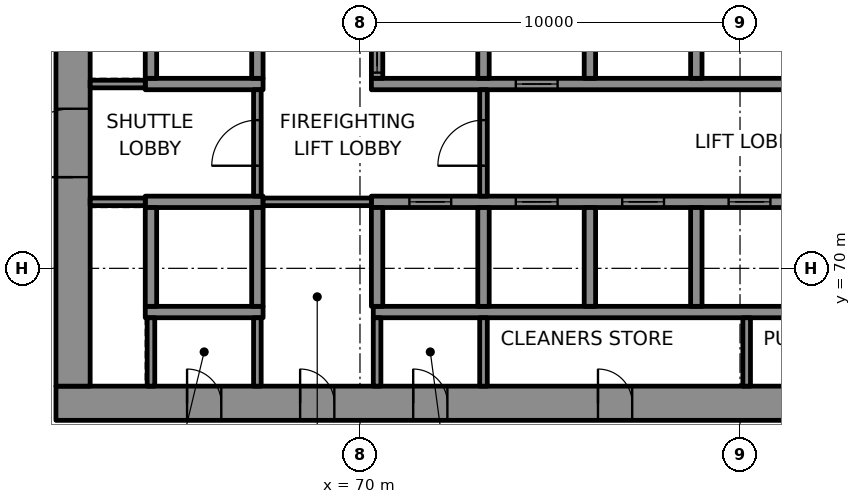
"""IFC4 building model, lengths in metres.
Left out: names, types, materials, properties, quantities, classifications, styles, units other than length and angle.
Written with IfcOpenShell. Run it as: python <this file> out.ifc"""

import sys

from ifc_helpers import new_model, si_unit, direction, frame, frame_2d, origin, place, context, subcontext, project, spatial, rectangle, extrude, element, fill, save


model = new_model("IFC4")
c1 = context("Model", 3, precision=1e-05, world=origin(), true_north=direction((0.0, 1.0)))
c2 = subcontext(c1, "Body", "Model", "MODEL_VIEW")
j1 = project(units=[si_unit("LENGTHUNIT", "METRE"), si_unit("PLANEANGLEUNIT", "RADIAN")], contexts=[c1])
p1 = place(None, origin())
s1 = spatial("IfcSite", under=j1, at=p1, CompositionType="ELEMENT")
p2 = place(p1, origin())
s2 = spatial("IfcBuilding", under=s1, at=p2, CompositionType="ELEMENT")
p3 = place(p2, frame((0.0, 0.0, 12.6)))
s3 = spatial("IfcBuildingStorey", under=s2, at=p3, CompositionType="ELEMENT", Elevation=12.6)
p4 = place(p3, frame((62.0, 66.45, 0.0), z_axis=(0.0, 0.0, 1.0), x_axis=(1.0, 0.0, 0.0)))
e1 = element("IfcWall", 1, at=p4, inside=s3, PredefinedType="SHEAR", context=c2, shape_type="SweptSolid", body=[
    extrude(rectangle(XDim=26.0, YDim=0.9, at=frame_2d((13.0, 0.0))), origin(), (0.0, 0.0, 1.0), 4.3),
])
p5 = place(p4, frame((3.45, 0.0, 0.0)))
e2 = element("IfcOpeningElement", 2, at=p5, cuts=e1, PredefinedType="OPENING", context=c2, shape_type="SweptSolid", body=[
    extrude(rectangle(XDim=0.9, YDim=2.1, at=frame_2d((0.45, 1.05))), frame((0.0, 0.46, 0.0), z_axis=(0.0, -1.0, 0.0), x_axis=(1.0, 0.0, 0.0)), (0.0, 0.0, 1.0), 0.92),
])
p6 = place(p4, frame((6.425, 0.0, 0.0)))
e3 = element("IfcOpeningElement", 3, at=p6, cuts=e1, PredefinedType="OPENING", context=c2, shape_type="SweptSolid", body=[
    extrude(rectangle(XDim=0.9, YDim=2.1, at=frame_2d((0.45, 1.05))), frame((0.0, 0.46, 0.0), z_axis=(0.0, -1.0, 0.0), x_axis=(1.0, 0.0, 0.0)), (0.0, 0.0, 1.0), 0.92),
])
p7 = place(p4, frame((9.4, 0.0, 0.0)))
e4 = element("IfcOpeningElement", 4, at=p7, cuts=e1, PredefinedType="OPENING", context=c2, shape_type="SweptSolid", body=[
    extrude(rectangle(XDim=0.9, YDim=2.1, at=frame_2d((0.45, 1.05))), frame((0.0, 0.46, 0.0), z_axis=(0.0, -1.0, 0.0), x_axis=(1.0, 0.0, 0.0)), (0.0, 0.0, 1.0), 0.92),
])
p8 = place(p4, frame((14.262, 0.0, 0.0)))
e5 = element("IfcOpeningElement", 5, at=p8, cuts=e1, PredefinedType="OPENING", context=c2, shape_type="SweptSolid", body=[
    extrude(rectangle(XDim=0.9, YDim=2.1, at=frame_2d((0.45, 1.05))), frame((0.0, 0.46, 0.0), z_axis=(0.0, -1.0, 0.0), x_axis=(1.0, 0.0, 0.0)), (0.0, 0.0, 1.0), 0.92),
])
p9 = place(p4, frame((21.188, 0.0, 0.0)))
e6 = element("IfcOpeningElement", 6, at=p9, cuts=e1, PredefinedType="OPENING", context=c2, shape_type="SweptSolid", body=[
    extrude(rectangle(XDim=0.9, YDim=2.1, at=frame_2d((0.45, 1.05))), frame((0.0, 0.46, 0.0), z_axis=(0.0, -1.0, 0.0), x_axis=(1.0, 0.0, 0.0)), (0.0, 0.0, 1.0), 0.92),
])
p10 = place(p3, frame((62.45, 66.9, 0.0), z_axis=(0.0, 0.0, 1.0), x_axis=(0.0, 1.0, 0.0)))
e7 = element("IfcWall", 7, at=p10, inside=s3, PredefinedType="SHEAR", context=c2, shape_type="SweptSolid", body=[
    extrude(rectangle(XDim=16.2, YDim=0.9, at=frame_2d((8.1, 0.0))), origin(), (0.0, 0.0, 1.0), 4.3),
])
p11 = place(p10, frame((5.5, 0.0, 0.0)))
e8 = element("IfcOpeningElement", 8, at=p11, cuts=e7, PredefinedType="OPENING", context=c2, shape_type="SweptSolid", body=[
    extrude(rectangle(XDim=1.8, YDim=2.1, at=frame_2d((0.9, 1.05))), frame((0.0, 0.46, 0.0), z_axis=(0.0, -1.0, 0.0), x_axis=(1.0, 0.0, 0.0)), (0.0, 0.0, 1.0), 0.92),
])
p12 = place(p3, frame((64.35, 68.85, 0.0), z_axis=(0.0, 0.0, 1.0), x_axis=(1.0, 0.0, 0.0)))
e9 = element("IfcWall", 9, at=p12, inside=s3, PredefinedType="SHEAR", context=c2, shape_type="SweptSolid", body=[
    extrude(rectangle(XDim=3.1, YDim=0.3, at=frame_2d((1.55, 0.0))), origin(), (0.0, 0.0, 1.0), 4.3),
])
p13 = place(p3, frame((70.35, 68.85, 0.0), z_axis=(0.0, 0.0, 1.0), x_axis=(1.0, 0.0, 0.0)))
e10 = element("IfcWall", 10, at=p13, inside=s3, PredefinedType="SHEAR", context=c2, shape_type="SweptSolid", body=[
    extrude(rectangle(XDim=16.75, YDim=0.3, at=frame_2d((8.375, 0.0))), origin(), (0.0, 0.0, 1.0), 4.3),
])
p14 = place(p3, frame((64.35, 71.75, 0.0), z_axis=(0.0, 0.0, 1.0), x_axis=(1.0, 0.0, 0.0)))
e11 = element("IfcWall", 11, at=p14, inside=s3, PredefinedType="SHEAR", context=c2, shape_type="SweptSolid", body=[
    extrude(rectangle(XDim=3.1, YDim=0.3, at=frame_2d((1.55, 0.0))), origin(), (0.0, 0.0, 1.0), 4.3),
])
p15 = place(p3, frame((70.3, 71.75, 0.0), z_axis=(0.0, 0.0, 1.0), x_axis=(1.0, 0.0, 0.0)))
e12 = element("IfcWall", 12, at=p15, inside=s3, PredefinedType="SHEAR", context=c2, shape_type="SweptSolid", body=[
    extrude(rectangle(XDim=16.8, YDim=0.3, at=frame_2d((8.4, 0.0))), origin(), (0.0, 0.0, 1.0), 4.3),
])
p16 = place(p15, frame((1.0, 0.0, 0.0)))
e13 = element("IfcOpeningElement", 13, at=p16, cuts=e12, PredefinedType="OPENING", context=c2, shape_type="SweptSolid", body=[
    extrude(rectangle(XDim=1.1, YDim=2.1, at=frame_2d((0.55, 1.05))), frame((0.0, 0.16, 0.0), z_axis=(0.0, -1.0, 0.0), x_axis=(1.0, 0.0, 0.0)), (0.0, 0.0, 1.0), 0.32),
])
p17 = place(p15, frame((3.8, 0.0, 0.0)))
e14 = element("IfcOpeningElement", 14, at=p17, cuts=e12, PredefinedType="OPENING", context=c2, shape_type="SweptSolid", body=[
    extrude(rectangle(XDim=1.1, YDim=2.1, at=frame_2d((0.55, 1.05))), frame((0.0, 0.16, 0.0), z_axis=(0.0, -1.0, 0.0), x_axis=(1.0, 0.0, 0.0)), (0.0, 0.0, 1.0), 0.32),
])
p18 = place(p15, frame((6.6, 0.0, 0.0)))
e15 = element("IfcOpeningElement", 15, at=p18, cuts=e12, PredefinedType="OPENING", context=c2, shape_type="SweptSolid", body=[
    extrude(rectangle(XDim=1.1, YDim=2.1, at=frame_2d((0.55, 1.05))), frame((0.0, 0.16, 0.0), z_axis=(0.0, -1.0, 0.0), x_axis=(1.0, 0.0, 0.0)), (0.0, 0.0, 1.0), 0.32),
])
p19 = place(p15, frame((9.4, 0.0, 0.0)))
e16 = element("IfcOpeningElement", 16, at=p19, cuts=e12, PredefinedType="OPENING", context=c2, shape_type="SweptSolid", body=[
    extrude(rectangle(XDim=1.1, YDim=2.1, at=frame_2d((0.55, 1.05))), frame((0.0, 0.16, 0.0), z_axis=(0.0, -1.0, 0.0), x_axis=(1.0, 0.0, 0.0)), (0.0, 0.0, 1.0), 0.32),
])
p20 = place(p15, frame((12.2, 0.0, 0.0)))
e17 = element("IfcOpeningElement", 17, at=p20, cuts=e12, PredefinedType="OPENING", context=c2, shape_type="SweptSolid", body=[
    extrude(rectangle(XDim=1.1, YDim=2.1, at=frame_2d((0.55, 1.05))), frame((0.0, 0.16, 0.0), z_axis=(0.0, -1.0, 0.0), x_axis=(1.0, 0.0, 0.0)), (0.0, 0.0, 1.0), 0.32),
])
p21 = place(p15, frame((14.925, 0.0, 0.0)))
e18 = element("IfcOpeningElement", 18, at=p21, cuts=e12, PredefinedType="OPENING", context=c2, shape_type="SweptSolid", body=[
    extrude(rectangle(XDim=1.1, YDim=2.1, at=frame_2d((0.55, 1.05))), frame((0.0, 0.16, 0.0), z_axis=(0.0, -1.0, 0.0), x_axis=(1.0, 0.0, 0.0)), (0.0, 0.0, 1.0), 0.32),
])
p22 = place(p3, frame((64.35, 74.85, 0.0), z_axis=(0.0, 0.0, 1.0), x_axis=(1.0, 0.0, 0.0)))
e19 = element("IfcWall", 19, at=p22, inside=s3, PredefinedType="SHEAR", context=c2, shape_type="SweptSolid", body=[
    extrude(rectangle(XDim=3.1, YDim=0.3, at=frame_2d((1.55, 0.0))), origin(), (0.0, 0.0, 1.0), 4.3),
])
p23 = place(p3, frame((70.3, 74.85, 0.0), z_axis=(0.0, 0.0, 1.0), x_axis=(1.0, 0.0, 0.0)))
e20 = element("IfcWall", 20, at=p23, inside=s3, PredefinedType="SHEAR", context=c2, shape_type="SweptSolid", body=[
    extrude(rectangle(XDim=16.8, YDim=0.3, at=frame_2d((8.4, 0.0))), origin(), (0.0, 0.0, 1.0), 4.3),
])
p24 = place(p23, frame((3.8, 0.0, 0.0)))
e21 = element("IfcOpeningElement", 21, at=p24, cuts=e20, PredefinedType="OPENING", context=c2, shape_type="SweptSolid", body=[
    extrude(rectangle(XDim=1.1, YDim=2.1, at=frame_2d((0.55, 1.05))), frame((0.0, 0.16, 0.0), z_axis=(0.0, -1.0, 0.0), x_axis=(1.0, 0.0, 0.0)), (0.0, 0.0, 1.0), 0.32),
])
p25 = place(p23, frame((12.2, 0.0, 0.0)))
e22 = element("IfcOpeningElement", 22, at=p25, cuts=e20, PredefinedType="OPENING", context=c2, shape_type="SweptSolid", body=[
    extrude(rectangle(XDim=1.1, YDim=2.1, at=frame_2d((0.55, 1.05))), frame((0.0, 0.16, 0.0), z_axis=(0.0, -1.0, 0.0), x_axis=(1.0, 0.0, 0.0)), (0.0, 0.0, 1.0), 0.32),
])
p26 = place(p23, frame((14.925, 0.0, 0.0)))
e23 = element("IfcOpeningElement", 23, at=p26, cuts=e20, PredefinedType="OPENING", context=c2, shape_type="SweptSolid", body=[
    extrude(rectangle(XDim=1.1, YDim=2.1, at=frame_2d((0.55, 1.05))), frame((0.0, 0.16, 0.0), z_axis=(0.0, -1.0, 0.0), x_axis=(1.0, 0.0, 0.0)), (0.0, 0.0, 1.0), 0.32),
])
for number, where, z_axis, x_axis in (
    (24, (64.5, 69.0, 0.0), (0.0, 0.0, 1.0), (0.0, 1.0, 0.0)),
    (25, (64.5, 75.0, 0.0), (0.0, 0.0, 1.0), (0.0, 1.0, 0.0)),
    (26, (67.3, 69.0, 0.0), (0.0, 0.0, 1.0), (0.0, 1.0, 0.0)),
    (27, (67.3, 75.0, 0.0), (0.0, 0.0, 1.0), (0.0, 1.0, 0.0)),
    (28, (70.45, 69.0, 0.0), (0.0, 0.0, 1.0), (0.0, 1.0, 0.0)),
):
    element("IfcWall", number, at=place(p3, frame(where, z_axis=z_axis, x_axis=x_axis)), inside=s3, PredefinedType="SHEAR", context=c2, shape_type="SweptSolid", body=[
        extrude(rectangle(XDim=2.6, YDim=0.3, at=frame_2d((1.3, 0.0))), origin(), (0.0, 0.0, 1.0), 4.3),
    ])
p27 = place(p3, frame((70.45, 75.0, 0.0), z_axis=(0.0, 0.0, 1.0), x_axis=(0.0, 1.0, 0.0)))
e29 = element("IfcWall", 29, at=p27, inside=s3, PredefinedType="SHEAR", context=c2, shape_type="SweptSolid", body=[
    extrude(rectangle(XDim=2.6, YDim=0.3, at=frame_2d((1.3, 0.0))), origin(), (0.0, 0.0, 1.0), 4.3),
])
p28 = place(p27, frame((0.15, 0.0, 0.0)))
e30 = element("IfcOpeningElement", 30, at=p28, cuts=e29, PredefinedType="OPENING", context=c2, shape_type="SweptSolid", body=[
    extrude(rectangle(XDim=1.1, YDim=2.1, at=frame_2d((0.55, 1.05))), frame((0.0, 0.16, 0.0), z_axis=(0.0, -1.0, 0.0), x_axis=(1.0, 0.0, 0.0)), (0.0, 0.0, 1.0), 0.32),
])
for number, where, z_axis, x_axis in (
    (31, (73.25, 69.0, 0.0), (0.0, 0.0, 1.0), (0.0, 1.0, 0.0)),
    (32, (73.25, 75.0, 0.0), (0.0, 0.0, 1.0), (0.0, 1.0, 0.0)),
    (33, (76.05, 69.0, 0.0), (0.0, 0.0, 1.0), (0.0, 1.0, 0.0)),
    (34, (76.05, 75.0, 0.0), (0.0, 0.0, 1.0), (0.0, 1.0, 0.0)),
    (35, (78.85, 69.0, 0.0), (0.0, 0.0, 1.0), (0.0, 1.0, 0.0)),
    (36, (78.85, 75.0, 0.0), (0.0, 0.0, 1.0), (0.0, 1.0, 0.0)),
):
    element("IfcWall", number, at=place(p3, frame(where, z_axis=z_axis, x_axis=x_axis)), inside=s3, PredefinedType="SHEAR", context=c2, shape_type="SweptSolid", body=[
        extrude(rectangle(XDim=2.6, YDim=0.3, at=frame_2d((1.3, 0.0))), origin(), (0.0, 0.0, 1.0), 4.3),
    ])
p29 = place(p3, frame((62.9, 71.75, 0.0), z_axis=(0.0, 0.0, 1.0), x_axis=(1.0, 0.0, 0.0)))
e37 = element("IfcWall", 37, at=p29, inside=s3, PredefinedType="PARTITIONING", context=c2, shape_type="SweptSolid", body=[
    extrude(rectangle(XDim=1.45, YDim=0.2, at=frame_2d((0.725, 0.0))), origin(), (0.0, 0.0, 1.0), 4.3),
])
p30 = place(p3, frame((67.45, 71.75, 0.0), z_axis=(0.0, 0.0, 1.0), x_axis=(1.0, 0.0, 0.0)))
e38 = element("IfcWall", 38, at=p30, inside=s3, PredefinedType="PARTITIONING", context=c2, shape_type="SweptSolid", body=[
    extrude(rectangle(XDim=2.85, YDim=0.2, at=frame_2d((1.425, 0.0))), origin(), (0.0, 0.0, 1.0), 4.3),
])
p31 = place(p3, frame((62.9, 74.85, 0.0), z_axis=(0.0, 0.0, 1.0), x_axis=(1.0, 0.0, 0.0)))
e39 = element("IfcWall", 39, at=p31, inside=s3, PredefinedType="PARTITIONING", context=c2, shape_type="SweptSolid", body=[
    extrude(rectangle(XDim=1.45, YDim=0.2, at=frame_2d((0.725, 0.0))), origin(), (0.0, 0.0, 1.0), 4.3),
])
for number, where, z_axis, x_axis in (
    (40, (64.5, 66.9, 0.0), (0.0, 0.0, 1.0), (0.0, 1.0, 0.0)),
    (41, (67.3, 66.9, 0.0), (0.0, 0.0, 1.0), (0.0, 1.0, 0.0)),
):
    element("IfcWall", number, at=place(p3, frame(where, z_axis=z_axis, x_axis=x_axis)), inside=s3, PredefinedType="PARTITIONING", context=c2, shape_type="SweptSolid", body=[
        extrude(rectangle(XDim=1.8, YDim=0.2, at=frame_2d((0.9, 0.0))), origin(), (0.0, 0.0, 1.0), 4.3),
    ])
p32 = place(p3, frame((67.3, 71.9, 0.0), z_axis=(0.0, 0.0, 1.0), x_axis=(0.0, 1.0, 0.0)))
e42 = element("IfcWall", 42, at=p32, inside=s3, PredefinedType="PARTITIONING", context=c2, shape_type="SweptSolid", body=[
    extrude(rectangle(XDim=2.8, YDim=0.2, at=frame_2d((1.4, 0.0))), origin(), (0.0, 0.0, 1.0), 4.3),
])
p33 = place(p32, frame((0.8, 0.0, 0.0)))
e43 = element("IfcOpeningElement", 43, at=p33, cuts=e42, PredefinedType="OPENING", context=c2, shape_type="SweptSolid", body=[
    extrude(rectangle(XDim=1.2, YDim=2.1, at=frame_2d((0.6, 1.05))), frame((0.0, 0.11, 0.0), z_axis=(0.0, -1.0, 0.0), x_axis=(1.0, 0.0, 0.0)), (0.0, 0.0, 1.0), 0.22),
])
for number, where, z_axis, x_axis in (
    (44, (70.45, 66.9, 0.0), (0.0, 0.0, 1.0), (0.0, 1.0, 0.0)),
    (45, (73.25, 66.9, 0.0), (0.0, 0.0, 1.0), (0.0, 1.0, 0.0)),
):
    element("IfcWall", number, at=place(p3, frame(where, z_axis=z_axis, x_axis=x_axis)), inside=s3, PredefinedType="PARTITIONING", context=c2, shape_type="SweptSolid", body=[
        extrude(rectangle(XDim=1.8, YDim=0.2, at=frame_2d((0.9, 0.0))), origin(), (0.0, 0.0, 1.0), 4.3),
    ])
p34 = place(p3, frame((73.25, 71.9, 0.0), z_axis=(0.0, 0.0, 1.0), x_axis=(0.0, 1.0, 0.0)))
e46 = element("IfcWall", 46, at=p34, inside=s3, PredefinedType="PARTITIONING", context=c2, shape_type="SweptSolid", body=[
    extrude(rectangle(XDim=2.8, YDim=0.2, at=frame_2d((1.4, 0.0))), origin(), (0.0, 0.0, 1.0), 4.3),
])
p35 = place(p34, frame((0.8, 0.0, 0.0)))
e47 = element("IfcOpeningElement", 47, at=p35, cuts=e46, PredefinedType="OPENING", context=c2, shape_type="SweptSolid", body=[
    extrude(rectangle(XDim=1.2, YDim=2.1, at=frame_2d((0.6, 1.05))), frame((0.0, 0.11, 0.0), z_axis=(0.0, -1.0, 0.0), x_axis=(1.0, 0.0, 0.0)), (0.0, 0.0, 1.0), 0.22),
])
p36 = place(p3, frame((80.175, 66.9, 0.0), z_axis=(0.0, 0.0, 1.0), x_axis=(0.0, 1.0, 0.0)))
e48 = element("IfcWall", 48, at=p36, inside=s3, PredefinedType="PARTITIONING", context=c2, shape_type="SweptSolid", body=[
    extrude(rectangle(XDim=1.8, YDim=0.2, at=frame_2d((0.9, 0.0))), origin(), (0.0, 0.0, 1.0), 4.3),
])
p37 = place(p3, frame((107.106, 62.36, 0.0), z_axis=(0.0, 0.0, 1.0), x_axis=(-0.49999992739, 0.866025445706, 0.0)))
e49 = element("IfcWall", 49, at=p37, inside=s3, PredefinedType="SOLIDWALL", context=c2, shape_type="SweptSolid", body=[
    extrude(rectangle(XDim=54.0, YDim=0.4, at=frame_2d((27.0, 0.0))), origin(), (0.0, 0.0, 1.0), 4.24),
])
p38 = place(p16, origin())
e50 = element("IfcDoor", 50, at=p38, inside=s3, OperationType="DOUBLE_DOOR_SLIDING", PredefinedType="DOOR", context=c2, shape_type="SweptSolid", body=[
    extrude(rectangle(XDim=1.1, YDim=2.1, at=frame_2d((0.55, 1.05))), frame((0.0, 0.025, 0.0), z_axis=(0.0, -1.0, 0.0), x_axis=(1.0, 0.0, 0.0)), (0.0, 0.0, 1.0), 0.05),
])
fill(e13, e50)
p39 = place(p17, origin())
e51 = element("IfcDoor", 51, at=p39, inside=s3, OperationType="DOUBLE_DOOR_SLIDING", PredefinedType="DOOR", context=c2, shape_type="SweptSolid", body=[
    extrude(rectangle(XDim=1.1, YDim=2.1, at=frame_2d((0.55, 1.05))), frame((0.0, 0.025, 0.0), z_axis=(0.0, -1.0, 0.0), x_axis=(1.0, 0.0, 0.0)), (0.0, 0.0, 1.0), 0.05),
])
fill(e14, e51)
p40 = place(p18, origin())
e52 = element("IfcDoor", 52, at=p40, inside=s3, OperationType="DOUBLE_DOOR_SLIDING", PredefinedType="DOOR", context=c2, shape_type="SweptSolid", body=[
    extrude(rectangle(XDim=1.1, YDim=2.1, at=frame_2d((0.55, 1.05))), frame((0.0, 0.025, 0.0), z_axis=(0.0, -1.0, 0.0), x_axis=(1.0, 0.0, 0.0)), (0.0, 0.0, 1.0), 0.05),
])
fill(e15, e52)
p41 = place(p19, origin())
e53 = element("IfcDoor", 53, at=p41, inside=s3, OperationType="DOUBLE_DOOR_SLIDING", PredefinedType="DOOR", context=c2, shape_type="SweptSolid", body=[
    extrude(rectangle(XDim=1.1, YDim=2.1, at=frame_2d((0.55, 1.05))), frame((0.0, 0.025, 0.0), z_axis=(0.0, -1.0, 0.0), x_axis=(1.0, 0.0, 0.0)), (0.0, 0.0, 1.0), 0.05),
])
fill(e16, e53)
p42 = place(p28, origin())
e54 = element("IfcDoor", 54, at=p42, inside=s3, OperationType="DOUBLE_DOOR_SLIDING", PredefinedType="DOOR", context=c2, shape_type="SweptSolid", body=[
    extrude(rectangle(XDim=1.1, YDim=2.1, at=frame_2d((0.55, 1.05))), frame((0.0, 0.025, 0.0), z_axis=(0.0, -1.0, 0.0), x_axis=(1.0, 0.0, 0.0)), (0.0, 0.0, 1.0), 0.05),
])
fill(e30, e54)
p43 = place(p24, origin())
e55 = element("IfcDoor", 55, at=p43, inside=s3, OperationType="DOUBLE_DOOR_SLIDING", PredefinedType="DOOR", context=c2, shape_type="SweptSolid", body=[
    extrude(rectangle(XDim=1.1, YDim=2.1, at=frame_2d((0.55, 1.05))), frame((0.0, 0.025, 0.0), z_axis=(0.0, -1.0, 0.0), x_axis=(1.0, 0.0, 0.0)), (0.0, 0.0, 1.0), 0.05),
])
fill(e21, e55)
p44 = place(p35, origin())
e56 = element("IfcDoor", 56, at=p44, inside=s3, OperationType="SINGLE_SWING_LEFT", PredefinedType="DOOR", context=c2, shape_type="SweptSolid", body=[
    extrude(rectangle(XDim=1.2, YDim=2.1, at=frame_2d((0.6, 1.05))), frame((0.0, 0.025, 0.0), z_axis=(0.0, -1.0, 0.0), x_axis=(1.0, 0.0, 0.0)), (0.0, 0.0, 1.0), 0.05),
])
fill(e47, e56)
p45 = place(p33, origin())
e57 = element("IfcDoor", 57, at=p45, inside=s3, OperationType="SINGLE_SWING_RIGHT", PredefinedType="DOOR", context=c2, shape_type="SweptSolid", body=[
    extrude(rectangle(XDim=1.2, YDim=2.1, at=frame_2d((0.6, 1.05))), frame((0.0, 0.025, 0.0), z_axis=(0.0, -1.0, 0.0), x_axis=(1.0, 0.0, 0.0)), (0.0, 0.0, 1.0), 0.05),
])
fill(e43, e57)
p46 = place(p11, origin())
e58 = element("IfcDoor", 58, at=p46, inside=s3, OperationType="SINGLE_SWING_LEFT", PredefinedType="DOOR", context=c2, shape_type="SweptSolid", body=[
    extrude(rectangle(XDim=1.8, YDim=2.1, at=frame_2d((0.9, 1.05))), frame((0.0, 0.17, 0.0), z_axis=(0.0, -1.0, 0.0), x_axis=(1.0, 0.0, 0.0)), (0.0, 0.0, 1.0), 0.34),
])
fill(e8, e58)
p47 = place(p5, origin())
e59 = element("IfcDoor", 59, at=p47, inside=s3, OperationType="SINGLE_SWING_LEFT", PredefinedType="DOOR", context=c2, shape_type="SweptSolid", body=[
    extrude(rectangle(XDim=0.9, YDim=2.1, at=frame_2d((0.45, 1.05))), frame((0.0, 0.17, 0.0), z_axis=(0.0, -1.0, 0.0), x_axis=(1.0, 0.0, 0.0)), (0.0, 0.0, 1.0), 0.34),
])
fill(e2, e59)
p48 = place(p6, origin())
e60 = element("IfcDoor", 60, at=p48, inside=s3, OperationType="SINGLE_SWING_RIGHT", PredefinedType="DOOR", context=c2, shape_type="SweptSolid", body=[
    extrude(rectangle(XDim=0.9, YDim=2.1, at=frame_2d((0.45, 1.05))), frame((0.0, 0.17, 0.0), z_axis=(0.0, -1.0, 0.0), x_axis=(1.0, 0.0, 0.0)), (0.0, 0.0, 1.0), 0.34),
])
fill(e3, e60)
p49 = place(p7, origin())
e61 = element("IfcDoor", 61, at=p49, inside=s3, OperationType="SINGLE_SWING_LEFT", PredefinedType="DOOR", context=c2, shape_type="SweptSolid", body=[
    extrude(rectangle(XDim=0.9, YDim=2.1, at=frame_2d((0.45, 1.05))), frame((0.0, 0.17, 0.0), z_axis=(0.0, -1.0, 0.0), x_axis=(1.0, 0.0, 0.0)), (0.0, 0.0, 1.0), 0.34),
])
fill(e4, e61)
p50 = place(p8, origin())
e62 = element("IfcDoor", 62, at=p50, inside=s3, OperationType="SINGLE_SWING_RIGHT", PredefinedType="DOOR", context=c2, shape_type="SweptSolid", body=[
    extrude(rectangle(XDim=0.9, YDim=2.1, at=frame_2d((0.45, 1.05))), frame((0.0, 0.17, 0.0), z_axis=(0.0, -1.0, 0.0), x_axis=(1.0, 0.0, 0.0)), (0.0, 0.0, 1.0), 0.34),
])
fill(e5, e62)
save(model, sys.argv[1])
